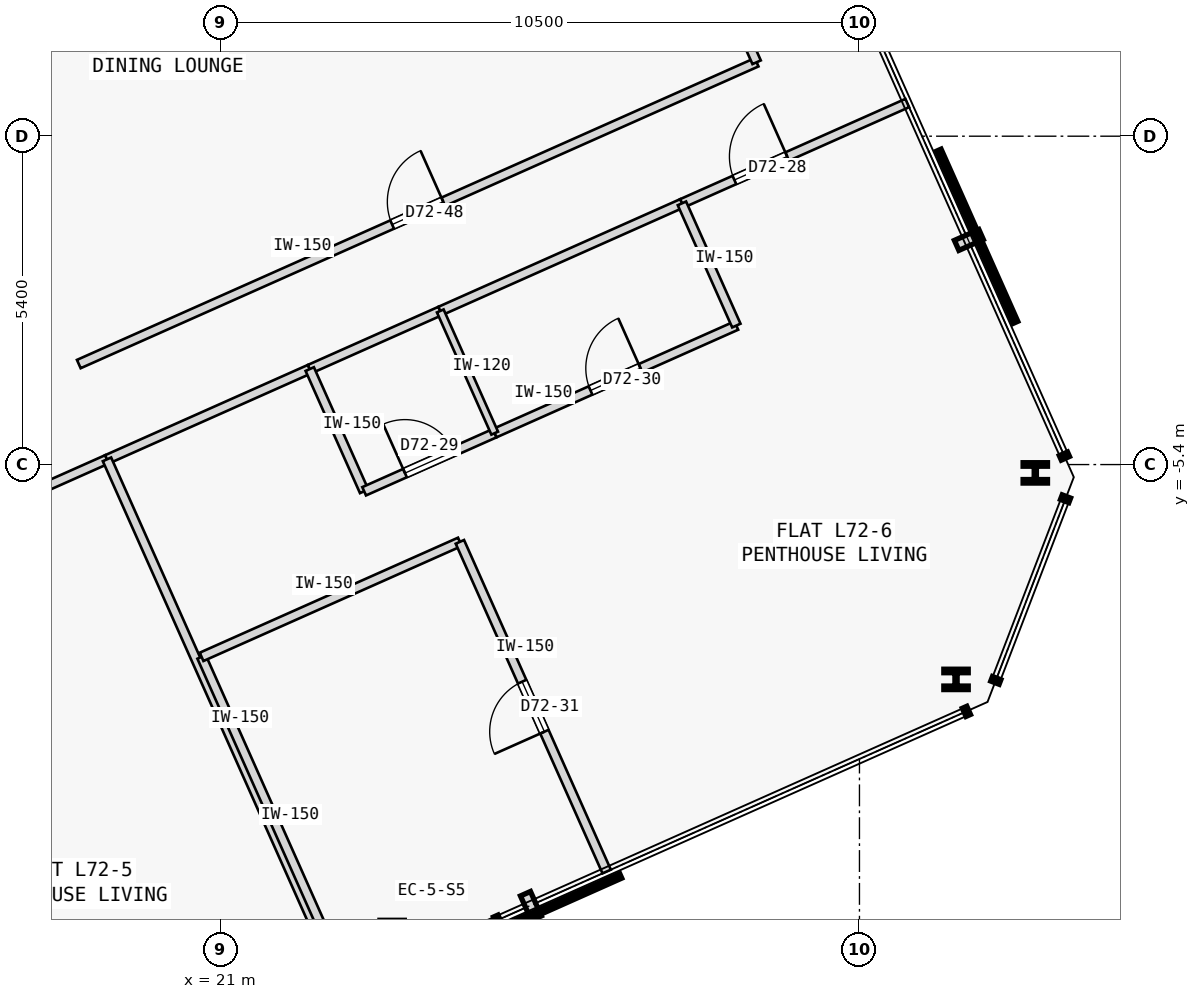
"""IFC4 building model, lengths in metres.
Left out: names, types, materials, properties, quantities, classifications, styles, units other than length and angle.
Written with IfcOpenShell. Run it as: python <this file> out.ifc"""

import sys

from ifc_helpers import new_model, si_unit, direction, frame, frame_2d, origin, origin_2d, place, context, subcontext, project, spatial, rectangle, i_section, extrude, element, fill, save


model = new_model("IFC4")
c1 = context("Model", 3, precision=1e-05, world=origin(), true_north=direction((0.0, 1.0)))
c2 = subcontext(c1, "Body", "Model", "MODEL_VIEW")
j1 = project(units=[si_unit("LENGTHUNIT", "METRE"), si_unit("PLANEANGLEUNIT", "RADIAN")], contexts=[c1])
p1 = place(None, origin())
s1 = spatial("IfcSite", under=j1, at=p1, CompositionType="ELEMENT")
p2 = place(p1, origin())
s2 = spatial("IfcBuilding", under=s1, at=p2, CompositionType="ELEMENT")
p3 = place(p2, frame((0.0, 0.0, 268.9)))
s3 = spatial("IfcBuildingStorey", under=s2, at=p3, CompositionType="ELEMENT", Elevation=268.9)
for number, where, z_axis, x_axis in (
    (1, (33.088, -8.933, 0.0), (0.0, 0.0, 1.0), (1.0, 0.0, 0.0)),
    (2, (34.392, -5.537, 0.0), (0.0, 0.0, 1.0), (1.0, 0.0, 0.0)),
):
    element("IfcColumn", number, at=place(p3, frame(where, z_axis=z_axis, x_axis=x_axis)), inside=s3, PredefinedType="COLUMN", context=c2, shape_type="SweptSolid", body=[
        extrude(i_section(OverallWidth=0.401, OverallDepth=0.335, WebThickness=0.036, FlangeThickness=0.058, FilletRadius=0.015, at=origin_2d()), origin(), (0.0, 0.0, 1.0), 3.35),
    ])
for number, where, z_axis, x_axis in (
    (3, (15.791, -6.799, 0.0), (0.0, 0.0, 1.0), (0.914, 0.407, 0.0)),
    (4, (19.125, -5.314, 0.0), (0.0, 0.0, 1.0), (0.914, 0.407, 0.0)),
):
    element("IfcWall", number, at=place(p3, frame(where, z_axis=z_axis, x_axis=x_axis)), inside=s3, PredefinedType="PARTITIONING", context=c2, shape_type="SweptSolid", body=[
        extrude(rectangle(XDim=3.65, YDim=0.15, at=frame_2d((1.825, 0.0))), origin(), (0.0, 0.0, 1.0), 3.125),
    ])
p4 = place(p3, frame((28.581, -1.104, 0.0), z_axis=(0.0, 0.0, 1.0), x_axis=(0.91352836412, 0.406775033585, 0.0)))
e5 = element("IfcWall", 5, at=p4, inside=s3, PredefinedType="PARTITIONING", context=c2, shape_type="SweptSolid", body=[
    extrude(rectangle(XDim=4.056, YDim=0.15, at=frame_2d((2.028, 0.0))), origin(), (0.0, 0.0, 1.0), 3.125),
])
p5 = place(p4, frame((0.945, 0.0, 0.0)))
e6 = element("IfcOpeningElement", 6, at=p5, cuts=e5, PredefinedType="OPENING", context=c2, shape_type="SweptSolid", body=[
    extrude(rectangle(XDim=0.95, YDim=2.15, at=frame_2d((0.475, 1.075))), frame((0.0, 0.085, 0.0), z_axis=(0.0, -1.0, 0.0), x_axis=(1.0, 0.0, 0.0)), (0.0, 0.0, 1.0), 0.17),
])
p6 = place(p3, frame((22.46, -3.83, 0.0), z_axis=(0.0, 0.0, 1.0), x_axis=(0.913541436194, 0.406745675276, 0.0)))
e7 = element("IfcWall", 7, at=p6, inside=s3, PredefinedType="PARTITIONING", context=c2, shape_type="SweptSolid", body=[
    extrude(rectangle(XDim=2.35, YDim=0.15, at=frame_2d((1.175, 0.0))), origin(), (0.0, 0.0, 1.0), 3.125),
])
p7 = place(p3, frame((24.606, -2.874, 0.0), z_axis=(0.0, 0.0, 1.0), x_axis=(0.913554477336, 0.406716383908, 0.0)))
e8 = element("IfcWall", 8, at=p7, inside=s3, PredefinedType="PARTITIONING", context=c2, shape_type="SweptSolid", body=[
    extrude(rectangle(XDim=4.35, YDim=0.15, at=frame_2d((2.175, 0.0))), origin(), (0.0, 0.0, 1.0), 3.125),
])
p8 = place(p3, frame((18.662, -3.747, 0.0), z_axis=(0.0, 0.0, 1.0), x_axis=(0.91353989142, 0.406749144787, 0.0)))
e9 = element("IfcWall", 9, at=p8, inside=s3, PredefinedType="PARTITIONING", context=c2, shape_type="SweptSolid", body=[
    extrude(rectangle(XDim=12.202, YDim=0.15, at=frame_2d((6.101, 0.0))), origin(), (0.0, 0.0, 1.0), 3.125),
])
p9 = place(p8, frame((5.641, 0.0, 0.0)))
e10 = element("IfcOpeningElement", 10, at=p9, cuts=e9, PredefinedType="OPENING", context=c2, shape_type="SweptSolid", body=[
    extrude(rectangle(XDim=0.92, YDim=2.15, at=frame_2d((0.46, 1.075))), frame((0.0, 0.085, 0.0), z_axis=(0.0, -1.0, 0.0), x_axis=(1.0, 0.0, 0.0)), (0.0, 0.0, 1.0), 0.17),
])
p10 = place(p3, frame((29.809, 1.216, 0.0), z_axis=(0.0, 0.0, 1.0), x_axis=(-0.406719136744, 0.913553251763, 0.0)))
e11 = element("IfcWall", 11, at=p10, inside=s3, PredefinedType="PARTITIONING", context=c2, shape_type="SweptSolid", body=[
    extrude(rectangle(XDim=7.489, YDim=0.15, at=frame_2d((3.745, 0.0))), origin(), (0.0, 0.0, 1.0), 3.125),
])
p11 = place(p3, frame((23.003, -14.025, 0.0), z_axis=(0.0, 0.0, 1.0), x_axis=(-0.406729927653, 0.913548447512, 0.0)))
e12 = element("IfcWall", 12, at=p11, inside=s3, PredefinedType="PARTITIONING", context=c2, shape_type="SweptSolid", body=[
    extrude(rectangle(XDim=9.535, YDim=0.15, at=frame_2d((4.768, 0.0))), origin(), (0.0, 0.0, 1.0), 3.125),
])
p12 = place(p3, frame((23.354, -5.839, 0.0), z_axis=(0.0, 0.0, 1.0), x_axis=(-0.406725294076, 0.913550510459, 0.0)))
e13 = element("IfcWall", 13, at=p12, inside=s3, PredefinedType="PARTITIONING", context=c2, shape_type="SweptSolid", body=[
    extrude(rectangle(XDim=2.2, YDim=0.15, at=frame_2d((1.1, 0.0))), origin(), (0.0, 0.0, 1.0), 3.125),
])
p13 = place(p3, frame((23.354, -5.839, 0.0), z_axis=(0.0, 0.0, 1.0), x_axis=(0.913558622212, 0.406707073682, 0.0)))
e14 = element("IfcWall", 14, at=p13, inside=s3, PredefinedType="PARTITIONING", context=c2, shape_type="SweptSolid", body=[
    extrude(rectangle(XDim=2.35, YDim=0.15, at=frame_2d((1.175, 0.0))), origin(), (0.0, 0.0, 1.0), 3.125),
])
p14 = place(p13, frame((0.735, 0.0, 0.0)))
e15 = element("IfcOpeningElement", 15, at=p14, cuts=e14, PredefinedType="OPENING", context=c2, shape_type="SweptSolid", body=[
    extrude(rectangle(XDim=0.88, YDim=2.15, at=frame_2d((0.44, 1.075))), frame((0.0, 0.085, 0.0), z_axis=(0.0, -1.0, 0.0), x_axis=(1.0, 0.0, 0.0)), (0.0, 0.0, 1.0), 0.17),
])
p15 = place(p3, frame((25.501, -4.884, 0.0), z_axis=(0.0, 0.0, 1.0), x_axis=(0.913545193015, 0.406737237438, 0.0)))
e16 = element("IfcWall", 16, at=p15, inside=s3, PredefinedType="PARTITIONING", context=c2, shape_type="SweptSolid", body=[
    extrude(rectangle(XDim=4.35, YDim=0.15, at=frame_2d((2.175, 0.0))), origin(), (0.0, 0.0, 1.0), 3.125),
])
p16 = place(p15, frame((1.725, 0.0, 0.0)))
e17 = element("IfcOpeningElement", 17, at=p16, cuts=e16, PredefinedType="OPENING", context=c2, shape_type="SweptSolid", body=[
    extrude(rectangle(XDim=0.9, YDim=2.15, at=frame_2d((0.45, 1.075))), frame((0.0, 0.085, 0.0), z_axis=(0.0, -1.0, 0.0), x_axis=(1.0, 0.0, 0.0)), (0.0, 0.0, 1.0), 0.17),
])
p17 = place(p3, frame((29.475, -3.114, 0.0), z_axis=(0.0, 0.0, 1.0), x_axis=(-0.406725294076, 0.913550510459, 0.0)))
e18 = element("IfcWall", 18, at=p17, inside=s3, PredefinedType="PARTITIONING", context=c2, shape_type="SweptSolid", body=[
    extrude(rectangle(XDim=2.2, YDim=0.15, at=frame_2d((1.1, 0.0))), origin(), (0.0, 0.0, 1.0), 3.125),
])
p18 = place(p3, frame((23.095, -13.984, 0.0), z_axis=(0.0, 0.0, 1.0), x_axis=(-0.406749048544, 0.913539934271, 0.0)))
e19 = element("IfcWall", 19, at=p18, inside=s3, PredefinedType="PARTITIONING", context=c2, shape_type="SweptSolid", body=[
    extrude(rectangle(XDim=5.935, YDim=0.15, at=frame_2d((2.968, 0.0))), origin(), (0.0, 0.0, 1.0), 3.125),
])
p19 = place(p3, frame((20.681, -8.562, 0.0), z_axis=(0.0, 0.0, 1.0), x_axis=(0.91354505039, 0.40673755778, 0.0)))
e20 = element("IfcWall", 20, at=p19, inside=s3, PredefinedType="PARTITIONING", context=c2, shape_type="SweptSolid", body=[
    extrude(rectangle(XDim=4.65, YDim=0.15, at=frame_2d((2.325, 0.0))), origin(), (0.0, 0.0, 1.0), 3.125),
])
p20 = place(p3, frame((27.343, -12.093, 0.0), z_axis=(0.0, 0.0, 1.0), x_axis=(-0.406714717734, 0.913555219119, 0.0)))
e21 = element("IfcWall", 21, at=p20, inside=s3, PredefinedType="PARTITIONING", context=c2, shape_type="SweptSolid", body=[
    extrude(rectangle(XDim=5.935, YDim=0.15, at=frame_2d((2.967, 0.0))), origin(), (0.0, 0.0, 1.0), 3.125),
])
p21 = place(p20, frame((2.518, 0.0, 0.0)))
e22 = element("IfcOpeningElement", 22, at=p21, cuts=e21, PredefinedType="OPENING", context=c2, shape_type="SweptSolid", body=[
    extrude(rectangle(XDim=0.9, YDim=2.15, at=frame_2d((0.45, 1.075))), frame((0.0, 0.085, 0.0), z_axis=(0.0, -1.0, 0.0), x_axis=(1.0, 0.0, 0.0)), (0.0, 0.0, 1.0), 0.17),
])
p22 = place(p3, frame((25.501, -4.884, 0.0), z_axis=(0.0, 0.0, 1.0), x_axis=(-0.406817905151, 0.913509273105, 0.0)))
e23 = element("IfcWall", 23, at=p22, inside=s3, PredefinedType="PARTITIONING", context=c2, shape_type="SweptSolid", body=[
    extrude(rectangle(XDim=2.2, YDim=0.12, at=frame_2d((1.1, 0.0))), origin(), (0.0, 0.0, 1.0), 3.125),
])
p23 = place(p5, origin())
e24 = element("IfcDoor", 24, at=p23, inside=s3, OperationType="SINGLE_SWING_RIGHT", PredefinedType="DOOR", context=c2, shape_type="SweptSolid", body=[
    extrude(rectangle(XDim=0.95, YDim=2.15, at=frame_2d((0.475, 1.075))), frame((0.0, 0.025, 0.0), z_axis=(0.0, -1.0, 0.0), x_axis=(1.0, 0.0, 0.0)), (0.0, 0.0, 1.0), 0.05),
])
fill(e6, e24)
p24 = place(p14, origin())
e25 = element("IfcDoor", 25, at=p24, inside=s3, OperationType="SINGLE_SWING_LEFT", PredefinedType="DOOR", context=c2, shape_type="SweptSolid", body=[
    extrude(rectangle(XDim=0.88, YDim=2.15, at=frame_2d((0.44, 1.075))), frame((0.0, 0.025, 0.0), z_axis=(0.0, -1.0, 0.0), x_axis=(1.0, 0.0, 0.0)), (0.0, 0.0, 1.0), 0.05),
])
fill(e15, e25)
p25 = place(p16, origin())
e26 = element("IfcDoor", 26, at=p25, inside=s3, OperationType="SINGLE_SWING_RIGHT", PredefinedType="DOOR", context=c2, shape_type="SweptSolid", body=[
    extrude(rectangle(XDim=0.9, YDim=2.15, at=frame_2d((0.45, 1.075))), frame((0.0, 0.025, 0.0), z_axis=(0.0, -1.0, 0.0), x_axis=(1.0, 0.0, 0.0)), (0.0, 0.0, 1.0), 0.05),
])
fill(e17, e26)
p26 = place(p21, origin())
e27 = element("IfcDoor", 27, at=p26, inside=s3, OperationType="SINGLE_SWING_LEFT", PredefinedType="DOOR", context=c2, shape_type="SweptSolid", body=[
    extrude(rectangle(XDim=0.9, YDim=2.15, at=frame_2d((0.45, 1.075))), frame((0.0, 0.025, 0.0), z_axis=(0.0, -1.0, 0.0), x_axis=(1.0, 0.0, 0.0)), (0.0, 0.0, 1.0), 0.05),
])
fill(e22, e27)
p27 = place(p9, origin())
e28 = element("IfcDoor", 28, at=p27, inside=s3, OperationType="SINGLE_SWING_RIGHT", PredefinedType="DOOR", context=c2, shape_type="SweptSolid", body=[
    extrude(rectangle(XDim=0.92, YDim=2.15, at=frame_2d((0.46, 1.075))), frame((0.0, 0.025, 0.0), z_axis=(0.0, -1.0, 0.0), x_axis=(1.0, 0.0, 0.0)), (0.0, 0.0, 1.0), 0.05),
])
fill(e10, e28)
save(model, sys.argv[1])
